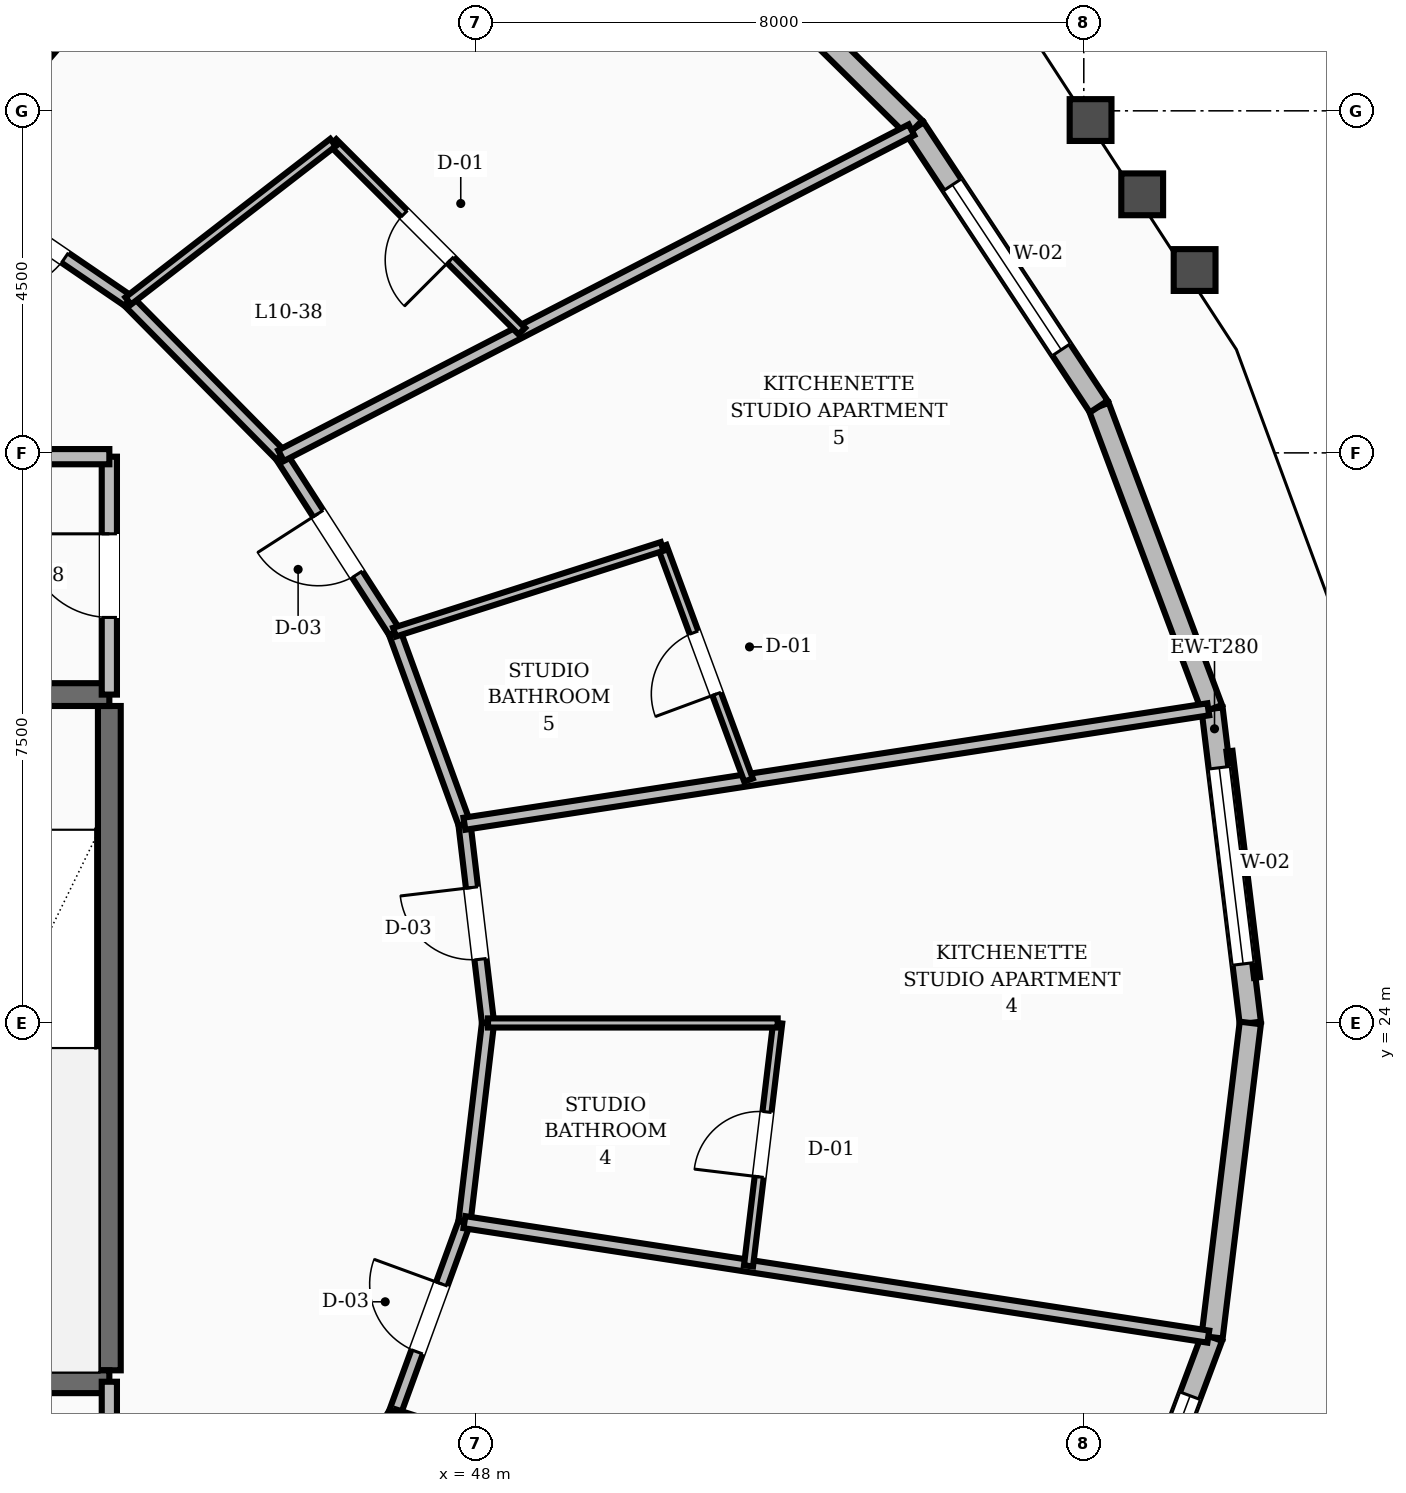
"""IFC4 building model, lengths in metres.
Left out: names, types, materials, properties, quantities, classifications, styles, units other than length and angle.
Written with IfcOpenShell. Run it as: python <this file> out.ifc"""

import sys

from ifc_helpers import new_model, si_unit, direction, frame, frame_2d, origin, place, context, subcontext, project, spatial, rectangle, extrude, element, fill, save


model = new_model("IFC4")
c1 = context("Model", 3, precision=1e-05, world=origin(), true_north=direction((0.0, 1.0)))
c2 = subcontext(c1, "Body", "Model", "MODEL_VIEW")
j1 = project(units=[si_unit("LENGTHUNIT", "METRE"), si_unit("PLANEANGLEUNIT", "RADIAN")], contexts=[c1])
p1 = place(None, origin())
s1 = spatial("IfcSite", under=j1, at=p1, CompositionType="ELEMENT")
p2 = place(p1, origin())
s2 = spatial("IfcBuilding", under=s1, at=p2, CompositionType="ELEMENT")
p3 = place(p2, frame((0.0, 0.0, 44.8)))
s3 = spatial("IfcBuildingStorey", under=s2, at=p3, CompositionType="ELEMENT", Elevation=44.8)
p4 = place(p3, frame((43.18, 19.43, 0.0), z_axis=(0.0, 0.0, 1.0), x_axis=(0.0, 1.0, 0.0)))
e1 = element("IfcWall", 1, at=p4, inside=s3, PredefinedType="SHEAR", context=c2, shape_type="SweptSolid", body=[
    extrude(rectangle(XDim=8.74, YDim=0.3, at=frame_2d((4.37, 0.0))), origin(), (0.0, 0.0, 1.0), 3.6),
])
p5 = place(p3, frame((39.58, 19.28, 0.0), z_axis=(0.0, 0.0, 1.0), x_axis=(1.0, 0.0, 0.0)))
e2 = element("IfcWall", 2, at=p5, inside=s3, PredefinedType="SHEAR", context=c2, shape_type="SweptSolid", body=[
    extrude(rectangle(XDim=3.6, YDim=0.3, at=frame_2d((1.8, 0.0))), origin(), (0.0, 0.0, 1.0), 3.6),
])
p6 = place(p3, frame((39.58, 28.32, 0.0), z_axis=(0.0, 0.0, 1.0), x_axis=(1.0, 0.0, 0.0)))
e3 = element("IfcWall", 3, at=p6, inside=s3, PredefinedType="SHEAR", context=c2, shape_type="SweptSolid", body=[
    extrude(rectangle(XDim=3.6, YDim=0.3, at=frame_2d((1.8, 0.0))), origin(), (0.0, 0.0, 1.0), 3.6),
])
p7 = place(p6, frame((1.3, 0.0, 0.0)))
e4 = element("IfcOpeningElement", 4, at=p7, cuts=e3, PredefinedType="OPENING", context=c2, shape_type="SweptSolid", body=[
    extrude(rectangle(XDim=1.1, YDim=2.1, at=frame_2d((0.55, 1.05))), frame((0.0, 0.16, 0.0), z_axis=(0.0, -1.0, 0.0), x_axis=(1.0, 0.0, 0.0)), (0.0, 0.0, 1.0), 0.32),
])
p8 = place(p3, frame((58.191, 24.0, 0.0), z_axis=(0.0, 0.0, 1.0), x_axis=(-0.120881081027, 0.992666995648, 0.0)))
e5 = element("IfcWall", 5, at=p8, inside=s3, PredefinedType="STANDARD", context=c2, shape_type="SweptSolid", body=[
    extrude(rectangle(XDim=4.165, YDim=0.28, at=frame_2d((2.082, 0.0))), origin(), (0.0, 0.0, 1.0), 2.65),
])
p9 = place(p8, frame((0.782, 0.0, 0.8)))
e6 = element("IfcOpeningElement", 6, at=p9, cuts=e5, PredefinedType="OPENING", context=c2, shape_type="SweptSolid", body=[
    extrude(rectangle(XDim=2.6, YDim=1.65, at=frame_2d((1.3, 0.825))), frame((0.0, 0.15, 0.0), z_axis=(0.0, -1.0, 0.0), x_axis=(1.0, 0.0, 0.0)), (0.0, 0.0, 1.0), 0.3),
])
p10 = place(p3, frame((57.688, 28.134, 0.0), z_axis=(0.0, 0.0, 1.0), x_axis=(-0.351066723894, 0.936350444745, 0.0)))
e7 = element("IfcWall", 7, at=p10, inside=s3, PredefinedType="STANDARD", context=c2, shape_type="SweptSolid", body=[
    extrude(rectangle(XDim=4.246, YDim=0.28, at=frame_2d((2.123, 0.0))), origin(), (0.0, 0.0, 1.0), 2.65),
])
p11 = place(p3, frame((56.197, 32.109, 0.0), z_axis=(0.0, 0.0, 1.0), x_axis=(-0.551192292831, 0.834378245356, 0.0)))
e8 = element("IfcWall", 8, at=p11, inside=s3, PredefinedType="STANDARD", context=c2, shape_type="SweptSolid", body=[
    extrude(rectangle(XDim=4.391, YDim=0.28, at=frame_2d((2.195, 0.0))), origin(), (0.0, 0.0, 1.0), 2.65),
])
p12 = place(p11, frame((0.896, 0.0, 0.8)))
e9 = element("IfcOpeningElement", 9, at=p12, cuts=e8, PredefinedType="OPENING", context=c2, shape_type="SweptSolid", body=[
    extrude(rectangle(XDim=2.6, YDim=1.65, at=frame_2d((1.3, 0.825))), frame((0.0, 0.15, 0.0), z_axis=(0.0, -1.0, 0.0), x_axis=(1.0, 0.0, 0.0)), (0.0, 0.0, 1.0), 0.3),
])
p13 = place(p3, frame((53.777, 35.773, 0.0), z_axis=(0.0, 0.0, 1.0), x_axis=(-0.712106444973, 0.702071514184, 0.0)))
e10 = element("IfcWall", 10, at=p13, inside=s3, PredefinedType="STANDARD", context=c2, shape_type="SweptSolid", body=[
    extrude(rectangle(XDim=4.574, YDim=0.28, at=frame_2d((2.287, 0.0))), origin(), (0.0, 0.0, 1.0), 2.65),
])
p14 = place(p3, frame((56.197, 15.891, 0.0), z_axis=(0.0, 0.0, 1.0), x_axis=(0.351066723894, 0.936350444745, 0.0)))
e11 = element("IfcWall", 11, at=p14, inside=s3, PredefinedType="STANDARD", context=c2, shape_type="SweptSolid", body=[
    extrude(rectangle(XDim=4.246, YDim=0.28, at=frame_2d((2.123, 0.0))), origin(), (0.0, 0.0, 1.0), 2.65),
])
p15 = place(p14, frame((0.823, 0.0, 0.8)))
e12 = element("IfcOpeningElement", 12, at=p15, cuts=e11, PredefinedType="OPENING", context=c2, shape_type="SweptSolid", body=[
    extrude(rectangle(XDim=2.6, YDim=1.65, at=frame_2d((1.3, 0.825))), frame((0.0, 0.15, 0.0), z_axis=(0.0, -1.0, 0.0), x_axis=(1.0, 0.0, 0.0)), (0.0, 0.0, 1.0), 0.3),
])
p16 = place(p3, frame((57.688, 19.866, 0.0), z_axis=(0.0, 0.0, 1.0), x_axis=(0.120881081027, 0.992666995648, 0.0)))
e13 = element("IfcWall", 13, at=p16, inside=s3, PredefinedType="STANDARD", context=c2, shape_type="SweptSolid", body=[
    extrude(rectangle(XDim=4.165, YDim=0.28, at=frame_2d((2.082, 0.0))), origin(), (0.0, 0.0, 1.0), 2.65),
])
p17 = place(p3, frame((43.18, 28.32, 0.0), z_axis=(0.0, 0.0, 1.0), x_axis=(0.0, 1.0, 0.0)))
e14 = element("IfcWall", 14, at=p17, inside=s3, PredefinedType="SOLIDWALL", context=c2, shape_type="SweptSolid", body=[
    extrude(rectangle(XDim=3.13, YDim=0.2, at=frame_2d((1.565, 0.0))), origin(), (0.0, 0.0, 1.0), 2.61),
])
p18 = place(p17, frame((1.015, 0.0, 0.0)))
e15 = element("IfcOpeningElement", 15, at=p18, cuts=e14, PredefinedType="OPENING", context=c2, shape_type="SweptSolid", body=[
    extrude(rectangle(XDim=1.1, YDim=2.1, at=frame_2d((0.55, 1.05))), frame((0.0, 0.11, 0.0), z_axis=(0.0, -1.0, 0.0), x_axis=(1.0, 0.0, 0.0)), (0.0, 0.0, 1.0), 0.22),
])
p19 = place(p3, frame((39.2, 31.45, 0.0), z_axis=(0.0, 0.0, 1.0), x_axis=(1.0, 0.0, 0.0)))
e16 = element("IfcWall", 16, at=p19, inside=s3, PredefinedType="SOLIDWALL", context=c2, shape_type="SweptSolid", body=[
    extrude(rectangle(XDim=3.98, YDim=0.2, at=frame_2d((1.99, 0.0))), origin(), (0.0, 0.0, 1.0), 2.61),
])
p20 = place(p3, frame((43.18, 16.55, 0.0), z_axis=(0.0, 0.0, 1.0), x_axis=(0.0, 1.0, 0.0)))
e17 = element("IfcWall", 17, at=p20, inside=s3, PredefinedType="SOLIDWALL", context=c2, shape_type="SweptSolid", body=[
    extrude(rectangle(XDim=2.73, YDim=0.2, at=frame_2d((1.365, 0.0))), origin(), (0.0, 0.0, 1.0), 2.61),
])
p21 = place(p20, frame((0.89, 0.0, 0.0)))
e18 = element("IfcOpeningElement", 18, at=p21, cuts=e17, PredefinedType="OPENING", context=c2, shape_type="SweptSolid", body=[
    extrude(rectangle(XDim=0.95, YDim=2.1, at=frame_2d((0.475, 1.05))), frame((0.0, 0.11, 0.0), z_axis=(0.0, -1.0, 0.0), x_axis=(1.0, 0.0, 0.0)), (0.0, 0.0, 1.0), 0.22),
])
p22 = place(p3, frame((48.162, 24.0, 0.0), z_axis=(0.0, 0.0, 1.0), x_axis=(-0.117667763342, 0.993053018459, 0.0)))
e19 = element("IfcWall", 19, at=p22, inside=s3, PredefinedType="SOLIDWALL", context=c2, shape_type="SweptSolid", body=[
    extrude(rectangle(XDim=2.639, YDim=0.16, at=frame_2d((1.32, 0.0))), origin(), (0.0, 0.0, 1.0), 2.61),
])
p23 = place(p22, frame((0.844, 0.0, 0.0)))
e20 = element("IfcOpeningElement", 20, at=p23, cuts=e19, PredefinedType="OPENING", context=c2, shape_type="SweptSolid", body=[
    extrude(rectangle(XDim=0.95, YDim=2.1, at=frame_2d((0.475, 1.05))), frame((0.0, 0.09, 0.0), z_axis=(0.0, -1.0, 0.0), x_axis=(1.0, 0.0, 0.0)), (0.0, 0.0, 1.0), 0.18),
])
p24 = place(p3, frame((47.852, 26.621, 0.0), z_axis=(0.0, 0.0, 1.0), x_axis=(-0.342882618672, 0.939378257047, 0.0)))
e21 = element("IfcWall", 21, at=p24, inside=s3, PredefinedType="SOLIDWALL", context=c2, shape_type="SweptSolid", body=[
    extrude(rectangle(XDim=2.683, YDim=0.16, at=frame_2d((1.341, 0.0))), origin(), (0.0, 0.0, 1.0), 2.61),
])
p25 = place(p3, frame((46.932, 29.141, 0.0), z_axis=(0.0, 0.0, 1.0), x_axis=(-0.540891657444, 0.841092274907, 0.0)))
e22 = element("IfcWall", 22, at=p25, inside=s3, PredefinedType="SOLIDWALL", context=c2, shape_type="SweptSolid", body=[
    extrude(rectangle(XDim=2.761, YDim=0.16, at=frame_2d((1.38, 0.0))), origin(), (0.0, 0.0, 1.0), 2.61),
])
p26 = place(p25, frame((0.906, 0.0, 0.0)))
e23 = element("IfcOpeningElement", 23, at=p26, cuts=e22, PredefinedType="OPENING", context=c2, shape_type="SweptSolid", body=[
    extrude(rectangle(XDim=0.95, YDim=2.1, at=frame_2d((0.475, 1.05))), frame((0.0, 0.09, 0.0), z_axis=(0.0, -1.0, 0.0), x_axis=(1.0, 0.0, 0.0)), (0.0, 0.0, 1.0), 0.18),
])
p27 = place(p3, frame((45.438, 31.463, 0.0), z_axis=(0.0, 0.0, 1.0), x_axis=(-0.702569520063, 0.711615113301, 0.0)))
e24 = element("IfcWall", 24, at=p27, inside=s3, PredefinedType="SOLIDWALL", context=c2, shape_type="SweptSolid", body=[
    extrude(rectangle(XDim=2.861, YDim=0.16, at=frame_2d((1.43, 0.0))), origin(), (0.0, 0.0, 1.0), 2.61),
])
p28 = place(p3, frame((43.428, 33.499, 0.0), z_axis=(0.0, 0.0, 1.0), x_axis=(-0.826112340767, 0.563505457323, 0.0)))
e25 = element("IfcWall", 25, at=p28, inside=s3, PredefinedType="SOLIDWALL", context=c2, shape_type="SweptSolid", body=[
    extrude(rectangle(XDim=2.965, YDim=0.16, at=frame_2d((1.482, 0.0))), origin(), (0.0, 0.0, 1.0), 2.61),
])
p29 = place(p28, frame((1.007, 0.0, 0.0)))
e26 = element("IfcOpeningElement", 26, at=p29, cuts=e25, PredefinedType="OPENING", context=c2, shape_type="SweptSolid", body=[
    extrude(rectangle(XDim=0.95, YDim=2.1, at=frame_2d((0.475, 1.05))), frame((0.0, 0.09, 0.0), z_axis=(0.0, -1.0, 0.0), x_axis=(1.0, 0.0, 0.0)), (0.0, 0.0, 1.0), 0.18),
])
p30 = place(p3, frame((45.438, 16.537, 0.0), z_axis=(0.0, 0.0, 1.0), x_axis=(0.540891657444, 0.841092274907, 0.0)))
e27 = element("IfcWall", 27, at=p30, inside=s3, PredefinedType="SOLIDWALL", context=c2, shape_type="SweptSolid", body=[
    extrude(rectangle(XDim=2.761, YDim=0.16, at=frame_2d((1.38, 0.0))), origin(), (0.0, 0.0, 1.0), 2.61),
])
p31 = place(p3, frame((46.932, 18.859, 0.0), z_axis=(0.0, 0.0, 1.0), x_axis=(0.342882618672, 0.939378257047, 0.0)))
e28 = element("IfcWall", 28, at=p31, inside=s3, PredefinedType="SOLIDWALL", context=c2, shape_type="SweptSolid", body=[
    extrude(rectangle(XDim=2.683, YDim=0.16, at=frame_2d((1.341, 0.0))), origin(), (0.0, 0.0, 1.0), 2.61),
])
p32 = place(p31, frame((0.866, 0.0, 0.0)))
e29 = element("IfcOpeningElement", 29, at=p32, cuts=e28, PredefinedType="OPENING", context=c2, shape_type="SweptSolid", body=[
    extrude(rectangle(XDim=0.95, YDim=2.1, at=frame_2d((0.475, 1.05))), frame((0.0, 0.09, 0.0), z_axis=(0.0, -1.0, 0.0), x_axis=(1.0, 0.0, 0.0)), (0.0, 0.0, 1.0), 0.18),
])
p33 = place(p3, frame((47.852, 21.379, 0.0), z_axis=(0.0, 0.0, 1.0), x_axis=(0.117667763342, 0.993053018459, 0.0)))
e30 = element("IfcWall", 30, at=p33, inside=s3, PredefinedType="SOLIDWALL", context=c2, shape_type="SweptSolid", body=[
    extrude(rectangle(XDim=2.639, YDim=0.16, at=frame_2d((1.32, 0.0))), origin(), (0.0, 0.0, 1.0), 2.61),
])
p34 = place(p3, frame((46.932, 18.859, 0.0), z_axis=(0.0, 0.0, 1.0), x_axis=(0.952329028564, -0.3050728132, 0.0)))
e31 = element("IfcWall", 31, at=p34, inside=s3, PredefinedType="PARTITIONING", context=c2, shape_type="SweptSolid", body=[
    extrude(rectangle(XDim=3.697, YDim=0.12, at=frame_2d((1.849, 0.0))), origin(), (0.0, 0.0, 1.0), 2.61),
])
p35 = place(p3, frame((47.852, 21.379, 0.0), z_axis=(0.0, 0.0, 1.0), x_axis=(0.988371982693, -0.152055331469, 0.0)))
e32 = element("IfcWall", 32, at=p35, inside=s3, PredefinedType="SOLIDWALL", context=c2, shape_type="SweptSolid", body=[
    extrude(rectangle(XDim=9.902, YDim=0.16, at=frame_2d((4.951, 0.0))), origin(), (0.0, 0.0, 1.0), 2.61),
])
p36 = place(p3, frame((51.589, 20.804, 0.0), z_axis=(0.0, 0.0, 1.0), x_axis=(0.119234947107, 0.992866067196, 0.0)))
e33 = element("IfcWall", 33, at=p36, inside=s3, PredefinedType="PARTITIONING", context=c2, shape_type="SweptSolid", body=[
    extrude(rectangle(XDim=3.219, YDim=0.12, at=frame_2d((1.609, 0.0))), origin(), (0.0, 0.0, 1.0), 2.61),
])
p37 = place(p36, frame((1.179, 0.0, 0.0)))
e34 = element("IfcOpeningElement", 34, at=p37, cuts=e33, PredefinedType="OPENING", context=c2, shape_type="SweptSolid", body=[
    extrude(rectangle(XDim=0.86, YDim=2.1, at=frame_2d((0.43, 1.05))), frame((0.0, 0.07, 0.0), z_axis=(0.0, -1.0, 0.0), x_axis=(1.0, 0.0, 0.0)), (0.0, 0.0, 1.0), 0.14),
])
p38 = place(p3, frame((48.162, 24.0, 0.0), z_axis=(0.0, 0.0, 1.0), x_axis=(1.0, 0.0, 0.0)))
e35 = element("IfcWall", 35, at=p38, inside=s3, PredefinedType="PARTITIONING", context=c2, shape_type="SweptSolid", body=[
    extrude(rectangle(XDim=3.811, YDim=0.12, at=frame_2d((1.905, 0.0))), origin(), (0.0, 0.0, 1.0), 2.61),
])
p39 = place(p3, frame((47.852, 26.621, 0.0), z_axis=(0.0, 0.0, 1.0), x_axis=(0.988371982693, 0.152055331469, 0.0)))
e36 = element("IfcWall", 36, at=p39, inside=s3, PredefinedType="SOLIDWALL", context=c2, shape_type="SweptSolid", body=[
    extrude(rectangle(XDim=9.902, YDim=0.16, at=frame_2d((4.951, 0.0))), origin(), (0.0, 0.0, 1.0), 2.61),
])
p40 = place(p3, frame((51.589, 27.196, 0.0), z_axis=(0.0, 0.0, 1.0), x_axis=(-0.346841100729, 0.937923904613, 0.0)))
e37 = element("IfcWall", 37, at=p40, inside=s3, PredefinedType="PARTITIONING", context=c2, shape_type="SweptSolid", body=[
    extrude(rectangle(XDim=3.277, YDim=0.12, at=frame_2d((1.638, 0.0))), origin(), (0.0, 0.0, 1.0), 2.61),
])
p41 = place(p40, frame((1.208, 0.0, 0.0)))
e38 = element("IfcOpeningElement", 38, at=p41, cuts=e37, PredefinedType="OPENING", context=c2, shape_type="SweptSolid", body=[
    extrude(rectangle(XDim=0.86, YDim=2.1, at=frame_2d((0.43, 1.05))), frame((0.0, 0.07, 0.0), z_axis=(0.0, -1.0, 0.0), x_axis=(1.0, 0.0, 0.0)), (0.0, 0.0, 1.0), 0.14),
])
p42 = place(p3, frame((46.932, 29.141, 0.0), z_axis=(0.0, 0.0, 1.0), x_axis=(0.952329028564, 0.3050728132, 0.0)))
e39 = element("IfcWall", 39, at=p42, inside=s3, PredefinedType="PARTITIONING", context=c2, shape_type="SweptSolid", body=[
    extrude(rectangle(XDim=3.697, YDim=0.12, at=frame_2d((1.849, 0.0))), origin(), (0.0, 0.0, 1.0), 2.61),
])
p43 = place(p3, frame((45.438, 31.463, 0.0), z_axis=(0.0, 0.0, 1.0), x_axis=(0.888369559671, 0.459129094537, 0.0)))
e40 = element("IfcWall", 40, at=p43, inside=s3, PredefinedType="SOLIDWALL", context=c2, shape_type="SweptSolid", body=[
    extrude(rectangle(XDim=9.336, YDim=0.16, at=frame_2d((4.668, 0.0))), origin(), (0.0, 0.0, 1.0), 2.61),
])
p44 = place(p3, frame((48.607, 33.101, 0.0), z_axis=(0.0, 0.0, 1.0), x_axis=(-0.707315315982, 0.706898184874, 0.0)))
e41 = element("IfcWall", 41, at=p44, inside=s3, PredefinedType="PARTITIONING", context=c2, shape_type="SweptSolid", body=[
    extrude(rectangle(XDim=3.512, YDim=0.12, at=frame_2d((1.756, 0.0))), origin(), (0.0, 0.0, 1.0), 2.61),
])
p45 = place(p44, frame((1.326, 0.0, 0.0)))
e42 = element("IfcOpeningElement", 42, at=p45, cuts=e41, PredefinedType="OPENING", context=c2, shape_type="SweptSolid", body=[
    extrude(rectangle(XDim=0.86, YDim=2.1, at=frame_2d((0.43, 1.05))), frame((0.0, 0.07, 0.0), z_axis=(0.0, -1.0, 0.0), x_axis=(1.0, 0.0, 0.0)), (0.0, 0.0, 1.0), 0.14),
])
p46 = place(p3, frame((43.428, 33.499, 0.0), z_axis=(0.0, 0.0, 1.0), x_axis=(0.79102015288, 0.611790092873, 0.0)))
e43 = element("IfcWall", 43, at=p46, inside=s3, PredefinedType="PARTITIONING", context=c2, shape_type="SweptSolid", body=[
    extrude(rectangle(XDim=3.407, YDim=0.12, at=frame_2d((1.703, 0.0))), origin(), (0.0, 0.0, 1.0), 2.61),
])
p47 = place(p3, frame((40.979, 35.17, 0.0), z_axis=(0.0, 0.0, 1.0), x_axis=(0.653724138874, 0.756732945136, 0.0)))
e44 = element("IfcWall", 44, at=p47, inside=s3, PredefinedType="SOLIDWALL", context=c2, shape_type="SweptSolid", body=[
    extrude(rectangle(XDim=8.473, YDim=0.16, at=frame_2d((4.237, 0.0))), origin(), (0.0, 0.0, 1.0), 2.61),
])
p48 = place(p9, origin())
e45 = element("IfcWindow", 45, at=p48, inside=s3, PartitioningType="SINGLE_PANEL", PredefinedType="WINDOW", context=c2, shape_type="SweptSolid", body=[
    extrude(rectangle(XDim=2.6, YDim=1.65, at=frame_2d((1.3, 0.825))), frame((0.0, 0.03, 0.0), z_axis=(0.0, -1.0, 0.0), x_axis=(1.0, 0.0, 0.0)), (0.0, 0.0, 1.0), 0.06),
])
fill(e6, e45)
p49 = place(p12, origin())
e46 = element("IfcWindow", 46, at=p49, inside=s3, PartitioningType="SINGLE_PANEL", PredefinedType="WINDOW", context=c2, shape_type="SweptSolid", body=[
    extrude(rectangle(XDim=2.6, YDim=1.65, at=frame_2d((1.3, 0.825))), frame((0.0, 0.03, 0.0), z_axis=(0.0, -1.0, 0.0), x_axis=(1.0, 0.0, 0.0)), (0.0, 0.0, 1.0), 0.06),
])
fill(e9, e46)
p50 = place(p15, origin())
e47 = element("IfcWindow", 47, at=p50, inside=s3, PartitioningType="SINGLE_PANEL", PredefinedType="WINDOW", context=c2, shape_type="SweptSolid", body=[
    extrude(rectangle(XDim=2.6, YDim=1.65, at=frame_2d((1.3, 0.825))), frame((0.0, 0.03, 0.0), z_axis=(0.0, -1.0, 0.0), x_axis=(1.0, 0.0, 0.0)), (0.0, 0.0, 1.0), 0.06),
])
fill(e12, e47)
p51 = place(p18, origin())
e48 = element("IfcDoor", 48, at=p51, inside=s3, OperationType="SINGLE_SWING_RIGHT", PredefinedType="DOOR", context=c2, shape_type="SweptSolid", body=[
    extrude(rectangle(XDim=1.1, YDim=2.1, at=frame_2d((0.55, 1.05))), frame((0.0, 0.025, 0.0), z_axis=(0.0, -1.0, 0.0), x_axis=(1.0, 0.0, 0.0)), (0.0, 0.0, 1.0), 0.05),
])
fill(e15, e48)
p52 = place(p32, origin())
e49 = element("IfcDoor", 49, at=p52, inside=s3, OperationType="SINGLE_SWING_RIGHT", PredefinedType="DOOR", context=c2, shape_type="SweptSolid", body=[
    extrude(rectangle(XDim=0.95, YDim=2.1, at=frame_2d((0.475, 1.05))), frame((0.0, 0.025, 0.0), z_axis=(0.0, -1.0, 0.0), x_axis=(1.0, 0.0, 0.0)), (0.0, 0.0, 1.0), 0.05),
])
fill(e29, e49)
p53 = place(p37, origin())
e50 = element("IfcDoor", 50, at=p53, inside=s3, OperationType="SINGLE_SWING_LEFT", PredefinedType="DOOR", context=c2, shape_type="SweptSolid", body=[
    extrude(rectangle(XDim=0.86, YDim=2.1, at=frame_2d((0.43, 1.05))), frame((0.0, 0.025, 0.0), z_axis=(0.0, -1.0, 0.0), x_axis=(1.0, 0.0, 0.0)), (0.0, 0.0, 1.0), 0.05),
])
fill(e34, e50)
p54 = place(p23, origin())
e51 = element("IfcDoor", 51, at=p54, inside=s3, OperationType="SINGLE_SWING_RIGHT", PredefinedType="DOOR", context=c2, shape_type="SweptSolid", body=[
    extrude(rectangle(XDim=0.95, YDim=2.1, at=frame_2d((0.475, 1.05))), frame((0.0, 0.025, 0.0), z_axis=(0.0, -1.0, 0.0), x_axis=(1.0, 0.0, 0.0)), (0.0, 0.0, 1.0), 0.05),
])
fill(e20, e51)
p55 = place(p41, origin())
e52 = element("IfcDoor", 52, at=p55, inside=s3, OperationType="SINGLE_SWING_LEFT", PredefinedType="DOOR", context=c2, shape_type="SweptSolid", body=[
    extrude(rectangle(XDim=0.86, YDim=2.1, at=frame_2d((0.43, 1.05))), frame((0.0, 0.025, 0.0), z_axis=(0.0, -1.0, 0.0), x_axis=(1.0, 0.0, 0.0)), (0.0, 0.0, 1.0), 0.05),
])
fill(e38, e52)
p56 = place(p26, origin())
e53 = element("IfcDoor", 53, at=p56, inside=s3, OperationType="SINGLE_SWING_RIGHT", PredefinedType="DOOR", context=c2, shape_type="SweptSolid", body=[
    extrude(rectangle(XDim=0.95, YDim=2.1, at=frame_2d((0.475, 1.05))), frame((0.0, 0.025, 0.0), z_axis=(0.0, -1.0, 0.0), x_axis=(1.0, 0.0, 0.0)), (0.0, 0.0, 1.0), 0.05),
])
fill(e23, e53)
p57 = place(p45, origin())
e54 = element("IfcDoor", 54, at=p57, inside=s3, OperationType="SINGLE_SWING_LEFT", PredefinedType="DOOR", context=c2, shape_type="SweptSolid", body=[
    extrude(rectangle(XDim=0.86, YDim=2.1, at=frame_2d((0.43, 1.05))), frame((0.0, 0.025, 0.0), z_axis=(0.0, -1.0, 0.0), x_axis=(1.0, 0.0, 0.0)), (0.0, 0.0, 1.0), 0.05),
])
fill(e42, e54)
p58 = place(p29, origin())
e55 = element("IfcDoor", 55, at=p58, inside=s3, OperationType="SINGLE_SWING_RIGHT", PredefinedType="DOOR", context=c2, shape_type="SweptSolid", body=[
    extrude(rectangle(XDim=0.95, YDim=2.1, at=frame_2d((0.475, 1.05))), frame((0.0, 0.025, 0.0), z_axis=(0.0, -1.0, 0.0), x_axis=(1.0, 0.0, 0.0)), (0.0, 0.0, 1.0), 0.05),
])
fill(e26, e55)
save(model, sys.argv[1])
